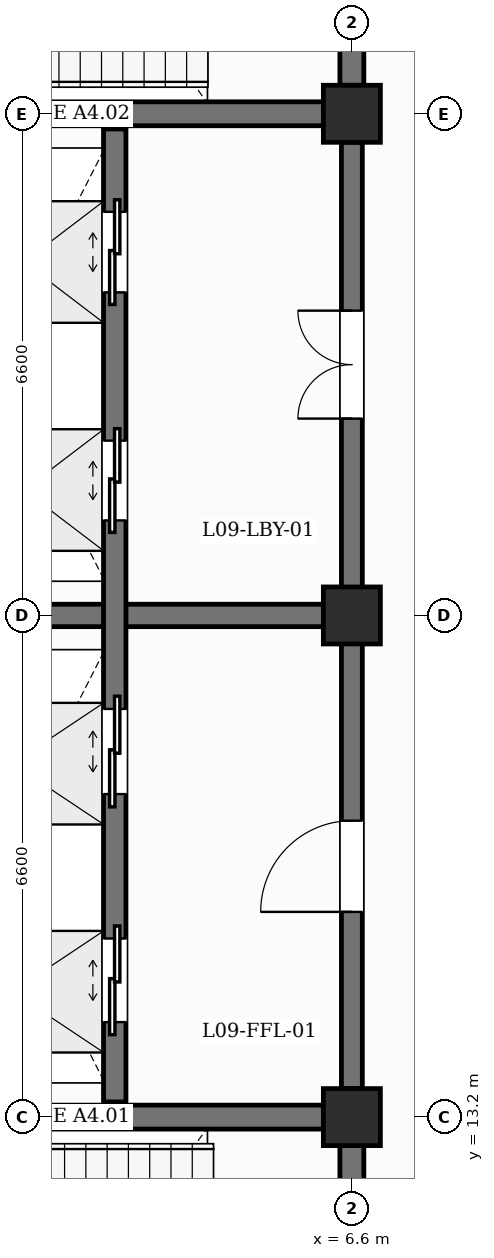
"""IFC4 building model, lengths in metres.
Left out: names, types, materials, properties, quantities, classifications, styles, units other than length and angle.
Written with IfcOpenShell. Run it as: python <this file> out.ifc"""

import sys

from ifc_helpers import new_model, si_unit, direction, frame, frame_2d, origin, origin_2d, place, context, subcontext, project, spatial, rectangle, extrude, element, fill, save


model = new_model("IFC4")
c1 = context("Model", 3, precision=1e-05, world=origin(), true_north=direction((0.0, 1.0)))
c2 = subcontext(c1, "Body", "Model", "MODEL_VIEW")
j1 = project(units=[si_unit("LENGTHUNIT", "METRE"), si_unit("PLANEANGLEUNIT", "RADIAN")], contexts=[c1])
p1 = place(None, origin())
s1 = spatial("IfcSite", under=j1, at=p1, CompositionType="ELEMENT")
p2 = place(p1, origin())
s2 = spatial("IfcBuilding", under=s1, at=p2, CompositionType="ELEMENT")
p3 = place(p2, frame((0.0, 0.0, 39.6)))
s3 = spatial("IfcBuildingStorey", under=s2, at=p3, CompositionType="ELEMENT", Elevation=39.6)
for number, where, z_axis, x_axis in (
    (1, (6.6, 13.2, 0.0), (0.0, 0.0, 1.0), (1.0, 0.0, 0.0)),
    (2, (6.6, 19.8, 0.0), (0.0, 0.0, 1.0), (1.0, 0.0, 0.0)),
    (3, (6.6, 26.4, 0.0), (0.0, 0.0, 1.0), (1.0, 0.0, 0.0)),
):
    element("IfcColumn", number, at=place(p3, frame(where, z_axis=z_axis, x_axis=x_axis)), inside=s3, PredefinedType="COLUMN", context=c2, shape_type="SweptSolid", body=[
        extrude(rectangle(XDim=0.75, YDim=0.75, at=origin_2d()), origin(), (0.0, 0.0, 1.0), 4.2),
    ])
p4 = place(p3, frame((0.375, 13.2, 0.0), z_axis=(0.0, 0.0, 1.0), x_axis=(1.0, 0.0, 0.0)))
e4 = element("IfcWall", 4, at=p4, inside=s3, PredefinedType="SHEAR", context=c2, shape_type="SweptSolid", body=[
    extrude(rectangle(XDim=5.85, YDim=0.315, at=frame_2d((2.925, 0.0))), origin(), (0.0, 0.0, 1.0), 3.29),
])
p5 = place(p3, frame((6.6, 6.975, 0.0), z_axis=(0.0, 0.0, 1.0), x_axis=(0.0, 1.0, 0.0)))
e5 = element("IfcWall", 5, at=p5, inside=s3, PredefinedType="SHEAR", context=c2, shape_type="SweptSolid", body=[
    extrude(rectangle(XDim=5.85, YDim=0.315, at=frame_2d((2.925, 0.0))), origin(), (0.0, 0.0, 1.0), 3.29),
])
p6 = place(p5, frame((2.375, 0.0, 0.0)))
e6 = element("IfcOpeningElement", 6, at=p6, cuts=e5, PredefinedType="OPENING", context=c2, shape_type="SweptSolid", body=[
    extrude(rectangle(XDim=1.1, YDim=2.15, at=frame_2d((0.55, 1.075))), frame((0.0, 0.167, 0.0), z_axis=(0.0, -1.0, 0.0), x_axis=(1.0, 0.0, 0.0)), (0.0, 0.0, 1.0), 0.335),
])
p7 = place(p3, frame((0.375, 26.4, 0.0), z_axis=(0.0, 0.0, 1.0), x_axis=(1.0, 0.0, 0.0)))
e7 = element("IfcWall", 7, at=p7, inside=s3, PredefinedType="SHEAR", context=c2, shape_type="SweptSolid", body=[
    extrude(rectangle(XDim=5.85, YDim=0.315, at=frame_2d((2.925, 0.0))), origin(), (0.0, 0.0, 1.0), 3.29),
])
p8 = place(p3, frame((6.6, 26.775, 0.0), z_axis=(0.0, 0.0, 1.0), x_axis=(0.0, 1.0, 0.0)))
e8 = element("IfcWall", 8, at=p8, inside=s3, PredefinedType="SHEAR", context=c2, shape_type="SweptSolid", body=[
    extrude(rectangle(XDim=5.875, YDim=0.315, at=frame_2d((2.938, 0.0))), origin(), (0.0, 0.0, 1.0), 3.29),
])
p9 = place(p8, frame((2.387, 0.0, 0.0)))
e9 = element("IfcOpeningElement", 9, at=p9, cuts=e8, PredefinedType="OPENING", context=c2, shape_type="SweptSolid", body=[
    extrude(rectangle(XDim=1.1, YDim=2.15, at=frame_2d((0.55, 1.075))), frame((0.0, 0.167, 0.0), z_axis=(0.0, -1.0, 0.0), x_axis=(1.0, 0.0, 0.0)), (0.0, 0.0, 1.0), 0.335),
])
p10 = place(p3, frame((0.375, 19.8, 0.0), z_axis=(0.0, 0.0, 1.0), x_axis=(1.0, 0.0, 0.0)))
e10 = element("IfcWall", 10, at=p10, inside=s3, PredefinedType="SHEAR", context=c2, shape_type="SweptSolid", body=[
    extrude(rectangle(XDim=5.85, YDim=0.295, at=frame_2d((2.925, 0.0))), origin(), (0.0, 0.0, 1.0), 3.29),
])
p11 = place(p3, frame((6.6, 13.575, 0.0), z_axis=(0.0, 0.0, 1.0), x_axis=(0.0, 1.0, 0.0)))
e11 = element("IfcWall", 11, at=p11, inside=s3, PredefinedType="SHEAR", context=c2, shape_type="SweptSolid", body=[
    extrude(rectangle(XDim=5.85, YDim=0.275, at=frame_2d((2.925, 0.0))), origin(), (0.0, 0.0, 1.0), 3.29),
])
p12 = place(p11, frame((2.325, 0.0, 0.0)))
e12 = element("IfcOpeningElement", 12, at=p12, cuts=e11, PredefinedType="OPENING", context=c2, shape_type="SweptSolid", body=[
    extrude(rectangle(XDim=1.2, YDim=2.25, at=frame_2d((0.6, 1.125))), frame((0.0, 0.147, 0.0), z_axis=(0.0, -1.0, 0.0), x_axis=(1.0, 0.0, 0.0)), (0.0, 0.0, 1.0), 0.295),
])
p13 = place(p3, frame((6.6, 20.175, 0.0), z_axis=(0.0, 0.0, 1.0), x_axis=(0.0, 1.0, 0.0)))
e13 = element("IfcWall", 13, at=p13, inside=s3, PredefinedType="SHEAR", context=c2, shape_type="SweptSolid", body=[
    extrude(rectangle(XDim=5.85, YDim=0.275, at=frame_2d((2.925, 0.0))), origin(), (0.0, 0.0, 1.0), 3.29),
])
p14 = place(p13, frame((2.215, 0.0, 0.0)))
e14 = element("IfcOpeningElement", 14, at=p14, cuts=e13, PredefinedType="OPENING", context=c2, shape_type="SweptSolid", body=[
    extrude(rectangle(XDim=1.42, YDim=2.2, at=frame_2d((0.71, 1.1))), frame((0.0, 0.147, 0.0), z_axis=(0.0, -1.0, 0.0), x_axis=(1.0, 0.0, 0.0)), (0.0, 0.0, 1.0), 0.295),
])
p15 = place(p3, frame((3.48, 13.4, 0.0), z_axis=(0.0, 0.0, 1.0), x_axis=(0.0, 1.0, 0.0)))
e15 = element("IfcWall", 15, at=p15, inside=s3, PredefinedType="SHEAR", context=c2, shape_type="SweptSolid", body=[
    extrude(rectangle(XDim=6.2, YDim=0.295, at=frame_2d((3.1, 0.0))), origin(), (0.0, 0.0, 1.0), 3.89),
])
p16 = place(p15, frame((1.05, 0.0, 0.0)))
e16 = element("IfcOpeningElement", 16, at=p16, cuts=e15, PredefinedType="OPENING", context=c2, shape_type="SweptSolid", body=[
    extrude(rectangle(XDim=1.1, YDim=2.15, at=frame_2d((0.55, 1.075))), frame((0.0, 0.157, 0.0), z_axis=(0.0, -1.0, 0.0), x_axis=(1.0, 0.0, 0.0)), (0.0, 0.0, 1.0), 0.315),
])
p17 = place(p15, frame((4.05, 0.0, 0.0)))
e17 = element("IfcOpeningElement", 17, at=p17, cuts=e15, PredefinedType="OPENING", context=c2, shape_type="SweptSolid", body=[
    extrude(rectangle(XDim=1.12, YDim=2.15, at=frame_2d((0.56, 1.075))), frame((0.0, 0.157, 0.0), z_axis=(0.0, -1.0, 0.0), x_axis=(1.0, 0.0, 0.0)), (0.0, 0.0, 1.0), 0.315),
])
p18 = place(p3, frame((3.48, 20.0, 0.0), z_axis=(0.0, 0.0, 1.0), x_axis=(0.0, 1.0, 0.0)))
e18 = element("IfcWall", 18, at=p18, inside=s3, PredefinedType="SHEAR", context=c2, shape_type="SweptSolid", body=[
    extrude(rectangle(XDim=6.2, YDim=0.295, at=frame_2d((3.1, 0.0))), origin(), (0.0, 0.0, 1.0), 3.89),
])
p19 = place(p18, frame((1.05, 0.0, 0.0)))
e19 = element("IfcOpeningElement", 19, at=p19, cuts=e18, PredefinedType="OPENING", context=c2, shape_type="SweptSolid", body=[
    extrude(rectangle(XDim=1.05, YDim=2.15, at=frame_2d((0.525, 1.075))), frame((0.0, 0.157, 0.0), z_axis=(0.0, -1.0, 0.0), x_axis=(1.0, 0.0, 0.0)), (0.0, 0.0, 1.0), 0.315),
])
p20 = place(p18, frame((4.05, 0.0, 0.0)))
e20 = element("IfcOpeningElement", 20, at=p20, cuts=e18, PredefinedType="OPENING", context=c2, shape_type="SweptSolid", body=[
    extrude(rectangle(XDim=1.06, YDim=2.15, at=frame_2d((0.53, 1.075))), frame((0.0, 0.157, 0.0), z_axis=(0.0, -1.0, 0.0), x_axis=(1.0, 0.0, 0.0)), (0.0, 0.0, 1.0), 0.315),
])
p21 = place(p16, origin())
e21 = element("IfcDoor", 21, at=p21, inside=s3, OperationType="DOUBLE_DOOR_SLIDING", PredefinedType="USERDEFINED", context=c2, shape_type="SweptSolid", body=[
    extrude(rectangle(XDim=1.1, YDim=2.15, at=frame_2d((0.55, 1.075))), frame((0.0, 0.025, 0.0), z_axis=(0.0, -1.0, 0.0), x_axis=(1.0, 0.0, 0.0)), (0.0, 0.0, 1.0), 0.05),
])
fill(e16, e21)
p22 = place(p17, origin())
e22 = element("IfcDoor", 22, at=p22, inside=s3, OperationType="DOUBLE_DOOR_SLIDING", PredefinedType="USERDEFINED", context=c2, shape_type="SweptSolid", body=[
    extrude(rectangle(XDim=1.12, YDim=2.15, at=frame_2d((0.56, 1.075))), frame((0.0, 0.025, 0.0), z_axis=(0.0, -1.0, 0.0), x_axis=(1.0, 0.0, 0.0)), (0.0, 0.0, 1.0), 0.05),
])
fill(e17, e22)
p23 = place(p19, origin())
e23 = element("IfcDoor", 23, at=p23, inside=s3, OperationType="DOUBLE_DOOR_SLIDING", PredefinedType="USERDEFINED", context=c2, shape_type="SweptSolid", body=[
    extrude(rectangle(XDim=1.05, YDim=2.15, at=frame_2d((0.525, 1.075))), frame((0.0, 0.025, 0.0), z_axis=(0.0, -1.0, 0.0), x_axis=(1.0, 0.0, 0.0)), (0.0, 0.0, 1.0), 0.05),
])
fill(e19, e23)
p24 = place(p20, origin())
e24 = element("IfcDoor", 24, at=p24, inside=s3, OperationType="DOUBLE_DOOR_SLIDING", PredefinedType="USERDEFINED", context=c2, shape_type="SweptSolid", body=[
    extrude(rectangle(XDim=1.06, YDim=2.15, at=frame_2d((0.53, 1.075))), frame((0.0, 0.025, 0.0), z_axis=(0.0, -1.0, 0.0), x_axis=(1.0, 0.0, 0.0)), (0.0, 0.0, 1.0), 0.05),
])
fill(e20, e24)
p25 = place(p12, origin())
e25 = element("IfcDoor", 25, at=p25, inside=s3, OperationType="SINGLE_SWING_LEFT", PredefinedType="DOOR", context=c2, shape_type="SweptSolid", body=[
    extrude(rectangle(XDim=1.2, YDim=2.25, at=frame_2d((0.6, 1.125))), frame((0.0, 0.025, 0.0), z_axis=(0.0, -1.0, 0.0), x_axis=(1.0, 0.0, 0.0)), (0.0, 0.0, 1.0), 0.05),
])
fill(e12, e25)
p26 = place(p14, origin())
e26 = element("IfcDoor", 26, at=p26, inside=s3, OperationType="DOUBLE_DOOR_SINGLE_SWING", PredefinedType="DOOR", context=c2, shape_type="SweptSolid", body=[
    extrude(rectangle(XDim=1.42, YDim=2.2, at=frame_2d((0.71, 1.1))), frame((0.0, 0.025, 0.0), z_axis=(0.0, -1.0, 0.0), x_axis=(1.0, 0.0, 0.0)), (0.0, 0.0, 1.0), 0.05),
])
fill(e14, e26)
save(model, sys.argv[1])
